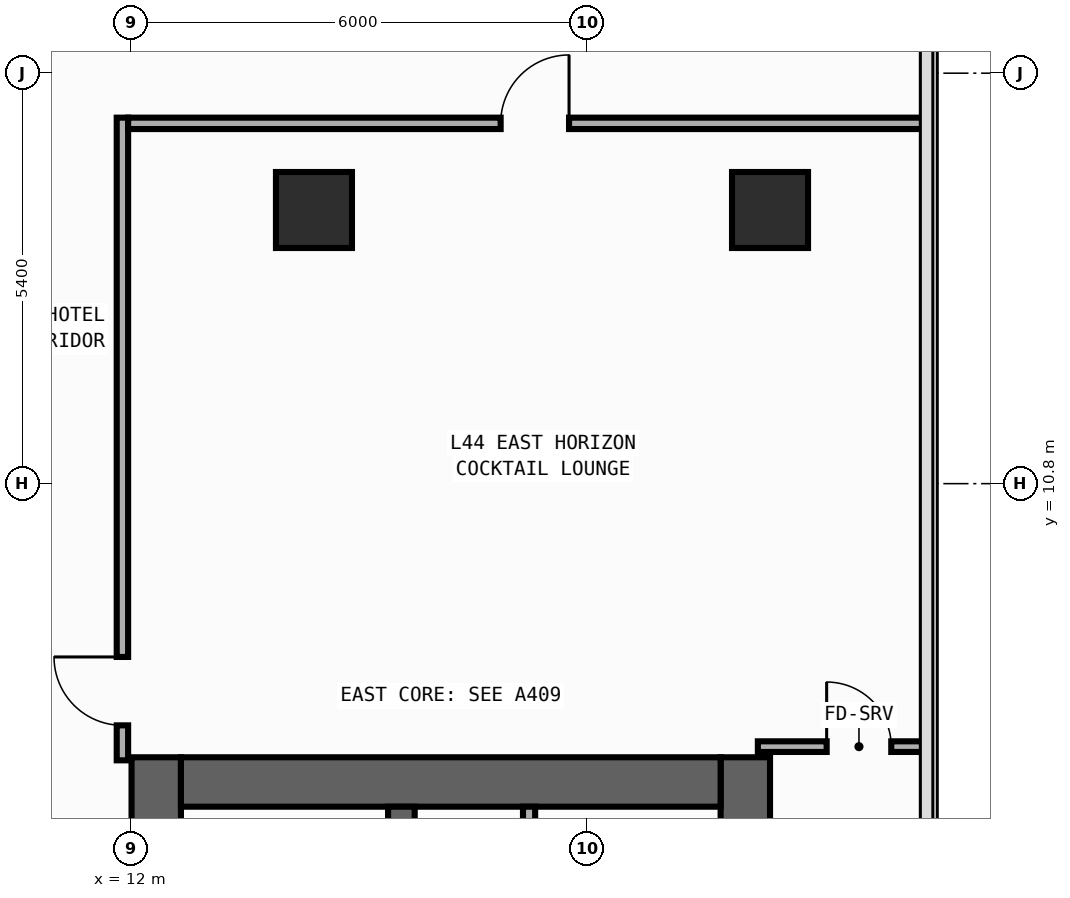
"""IFC4 building model, lengths in metres.
Left out: names, types, materials, properties, quantities, classifications, styles, units other than length and angle.
Written with IfcOpenShell. Run it as: python <this file> out.ifc"""

import sys

from ifc_helpers import new_model, si_unit, direction, frame, frame_2d, origin, origin_2d, place, context, subcontext, project, spatial, rectangle, extrude, element, fill, save


model = new_model("IFC4")
c1 = context("Model", 3, precision=1e-05, world=origin(), true_north=direction((0.0, 1.0)))
c2 = subcontext(c1, "Body", "Model", "MODEL_VIEW")
j1 = project(units=[si_unit("LENGTHUNIT", "METRE"), si_unit("PLANEANGLEUNIT", "RADIAN")], contexts=[c1])
p1 = place(None, origin())
s1 = spatial("IfcSite", under=j1, at=p1, CompositionType="ELEMENT")
p2 = place(p1, origin())
s2 = spatial("IfcBuilding", under=s1, at=p2, CompositionType="ELEMENT")
p3 = place(p2, frame((0.0, 0.0, 191.6)))
s3 = spatial("IfcBuildingStorey", under=s2, at=p3, CompositionType="ELEMENT", Elevation=191.6)
p4 = place(p3, frame((12.325, -19.8, 0.0), z_axis=(0.0, 0.0, 1.0), x_axis=(0.0, 1.0, 0.0)))
e1 = element("IfcWall", 1, at=p4, inside=s3, PredefinedType="SHEAR", context=c2, shape_type="SweptSolid", body=[
    extrude(rectangle(XDim=27.0, YDim=0.65, at=frame_2d((13.5, 0.0))), origin(), (0.0, 0.0, 1.0), 3.54),
])
p5 = place(p4, frame((23.05, 0.0, 0.0)))
e2 = element("IfcOpeningElement", 2, at=p5, cuts=e1, PredefinedType="OPENING", context=c2, shape_type="SweptSolid", body=[
    extrude(rectangle(XDim=1.1, YDim=2.2, at=frame_2d((0.55, 1.1))), frame((0.0, 0.335, 0.0), z_axis=(0.0, -1.0, 0.0), x_axis=(1.0, 0.0, 0.0)), (0.0, 0.0, 1.0), 0.67),
])
p6 = place(p4, frame((19.85, 0.0, 0.0)))
e3 = element("IfcOpeningElement", 3, at=p6, cuts=e1, PredefinedType="OPENING", context=c2, shape_type="SweptSolid", body=[
    extrude(rectangle(XDim=1.1, YDim=2.2, at=frame_2d((0.55, 1.1))), frame((0.0, 0.335, 0.0), z_axis=(0.0, -1.0, 0.0), x_axis=(1.0, 0.0, 0.0)), (0.0, 0.0, 1.0), 0.67),
])
p7 = place(p4, frame((16.65, 0.0, 0.0)))
e4 = element("IfcOpeningElement", 4, at=p7, cuts=e1, PredefinedType="OPENING", context=c2, shape_type="SweptSolid", body=[
    extrude(rectangle(XDim=1.1, YDim=2.2, at=frame_2d((0.55, 1.1))), frame((0.0, 0.335, 0.0), z_axis=(0.0, -1.0, 0.0), x_axis=(1.0, 0.0, 0.0)), (0.0, 0.0, 1.0), 0.67),
])
p8 = place(p4, frame((7.175, 0.0, 0.0)))
e5 = element("IfcOpeningElement", 5, at=p8, cuts=e1, PredefinedType="OPENING", context=c2, shape_type="SweptSolid", body=[
    extrude(rectangle(XDim=0.85, YDim=2.1, at=frame_2d((0.425, 1.05))), frame((0.0, 0.335, 0.0), z_axis=(0.0, -1.0, 0.0), x_axis=(1.0, 0.0, 0.0)), (0.0, 0.0, 1.0), 0.67),
])
p9 = place(p4, frame((10.375, 0.0, 0.0)))
e6 = element("IfcOpeningElement", 6, at=p9, cuts=e1, PredefinedType="OPENING", context=c2, shape_type="SweptSolid", body=[
    extrude(rectangle(XDim=0.85, YDim=2.1, at=frame_2d((0.425, 1.05))), frame((0.0, 0.335, 0.0), z_axis=(0.0, -1.0, 0.0), x_axis=(1.0, 0.0, 0.0)), (0.0, 0.0, 1.0), 0.67),
])
p10 = place(p4, frame((12.725, 0.0, 0.0)))
e7 = element("IfcOpeningElement", 7, at=p10, cuts=e1, PredefinedType="OPENING", context=c2, shape_type="SweptSolid", body=[
    extrude(rectangle(XDim=1.15, YDim=2.2, at=frame_2d((0.575, 1.1))), frame((0.0, 0.335, 0.0), z_axis=(0.0, -1.0, 0.0), x_axis=(1.0, 0.0, 0.0)), (0.0, 0.0, 1.0), 0.67),
])
p11 = place(p4, frame((25.125, 0.0, 0.0)))
e8 = element("IfcOpeningElement", 8, at=p11, cuts=e1, PredefinedType="OPENING", context=c2, shape_type="SweptSolid", body=[
    extrude(rectangle(XDim=0.85, YDim=2.1, at=frame_2d((0.425, 1.05))), frame((0.0, 0.335, 0.0), z_axis=(0.0, -1.0, 0.0), x_axis=(1.0, 0.0, 0.0)), (0.0, 0.0, 1.0), 0.67),
])
p12 = place(p3, frame((20.075, -19.8, 0.0), z_axis=(0.0, 0.0, 1.0), x_axis=(0.0, 1.0, 0.0)))
e9 = element("IfcWall", 9, at=p12, inside=s3, PredefinedType="SHEAR", context=c2, shape_type="SweptSolid", body=[
    extrude(rectangle(XDim=27.0, YDim=0.65, at=frame_2d((13.5, 0.0))), origin(), (0.0, 0.0, 1.0), 3.54),
])
p13 = place(p3, frame((12.65, 6.875, 0.0), z_axis=(0.0, 0.0, 1.0), x_axis=(1.0, 0.0, 0.0)))
e10 = element("IfcWall", 10, at=p13, inside=s3, PredefinedType="SHEAR", context=c2, shape_type="SweptSolid", body=[
    extrude(rectangle(XDim=7.1, YDim=0.65, at=frame_2d((3.55, 0.0))), origin(), (0.0, 0.0, 1.0), 3.54),
])
p14 = place(p3, frame((15.55, -19.15, 0.0), z_axis=(0.0, 0.0, 1.0), x_axis=(0.0, 1.0, 0.0)))
e11 = element("IfcWall", 11, at=p14, inside=s3, PredefinedType="SHEAR", context=c2, shape_type="SweptSolid", body=[
    extrude(rectangle(XDim=25.7, YDim=0.35, at=frame_2d((12.85, 0.0))), origin(), (0.0, 0.0, 1.0), 3.54),
])
p15 = place(p14, frame((12.075, 0.0, 0.0)))
e12 = element("IfcOpeningElement", 12, at=p15, cuts=e11, PredefinedType="OPENING", context=c2, shape_type="SweptSolid", body=[
    extrude(rectangle(XDim=1.15, YDim=2.2, at=frame_2d((0.575, 1.1))), frame((0.0, 0.185, 0.0), z_axis=(0.0, -1.0, 0.0), x_axis=(1.0, 0.0, 0.0)), (0.0, 0.0, 1.0), 0.37),
])
p16 = place(p14, frame((24.475, 0.0, 0.0)))
e13 = element("IfcOpeningElement", 13, at=p16, cuts=e11, PredefinedType="OPENING", context=c2, shape_type="SweptSolid", body=[
    extrude(rectangle(XDim=0.85, YDim=2.1, at=frame_2d((0.425, 1.05))), frame((0.0, 0.185, 0.0), z_axis=(0.0, -1.0, 0.0), x_axis=(1.0, 0.0, 0.0)), (0.0, 0.0, 1.0), 0.37),
])
for number, where, z_axis, x_axis in (
    (14, (20.4, 14.4, 0.0), (0.0, 0.0, 1.0), (1.0, 0.0, 0.0)),
    (15, (14.4, 14.4, 0.0), (0.0, 0.0, 1.0), (1.0, 0.0, 0.0)),
):
    element("IfcColumn", number, at=place(p3, frame(where, z_axis=z_axis, x_axis=x_axis)), inside=s3, PredefinedType="COLUMN", context=c2, shape_type="SweptSolid", body=[
        extrude(rectangle(XDim=1.0, YDim=1.0, at=origin_2d()), origin(), (0.0, 0.0, 1.0), 3.8),
    ])
p17 = place(p3, frame((17.23, 4.17, 0.0), z_axis=(0.0, 0.0, 1.0), x_axis=(0.0, 1.0, 0.0)))
e16 = element("IfcWall", 16, at=p17, inside=s3, PredefinedType="PARTITIONING", context=c2, shape_type="SweptSolid", body=[
    extrude(rectangle(XDim=2.38, YDim=0.16, at=frame_2d((1.19, 0.0))), origin(), (0.0, 0.0, 1.0), 3.54),
])
p18 = place(p17, frame((0.46, 0.0, 0.0)))
e17 = element("IfcOpeningElement", 17, at=p18, cuts=e16, PredefinedType="OPENING", context=c2, shape_type="SweptSolid", body=[
    extrude(rectangle(XDim=0.85, YDim=2.1, at=frame_2d((0.425, 1.05))), frame((0.0, 0.09, 0.0), z_axis=(0.0, -1.0, 0.0), x_axis=(1.0, 0.0, 0.0)), (0.0, 0.0, 1.0), 0.18),
])
p19 = place(p3, frame((11.88, 7.16, 0.0), z_axis=(0.0, 0.0, 1.0), x_axis=(0.0, 1.0, 0.0)))
e18 = element("IfcWall", 18, at=p19, inside=s3, PredefinedType="PARTITIONING", context=c2, shape_type="SweptSolid", body=[
    extrude(rectangle(XDim=8.455, YDim=0.15, at=frame_2d((4.228, 0.0))), origin(), (0.0, 0.0, 1.0), 3.54),
])
p20 = place(p19, frame((0.46, 0.0, 0.0)))
e19 = element("IfcOpeningElement", 19, at=p20, cuts=e18, PredefinedType="OPENING", context=c2, shape_type="SweptSolid", body=[
    extrude(rectangle(XDim=0.9, YDim=2.15, at=frame_2d((0.45, 1.075))), frame((0.0, 0.085, 0.0), z_axis=(0.0, -1.0, 0.0), x_axis=(1.0, 0.0, 0.0)), (0.0, 0.0, 1.0), 0.17),
])
p21 = place(p3, frame((11.955, 15.54, 0.0), z_axis=(0.0, 0.0, 1.0), x_axis=(1.0, 0.0, 0.0)))
e20 = element("IfcWall", 20, at=p21, inside=s3, PredefinedType="PARTITIONING", context=c2, shape_type="SweptSolid", body=[
    extrude(rectangle(XDim=10.5, YDim=0.15, at=frame_2d((5.25, 0.0))), origin(), (0.0, 0.0, 1.0), 3.54),
])
p22 = place(p21, frame((4.901, 0.0, 0.0)))
e21 = element("IfcOpeningElement", 21, at=p22, cuts=e20, PredefinedType="OPENING", context=c2, shape_type="SweptSolid", body=[
    extrude(rectangle(XDim=0.9, YDim=2.15, at=frame_2d((0.45, 1.075))), frame((0.0, 0.085, 0.0), z_axis=(0.0, -1.0, 0.0), x_axis=(1.0, 0.0, 0.0)), (0.0, 0.0, 1.0), 0.17),
])
p23 = place(p3, frame((20.24, 7.34, 0.0), z_axis=(0.0, 0.0, 1.0), x_axis=(1.0, 0.0, 0.0)))
e22 = element("IfcWall", 22, at=p23, inside=s3, PredefinedType="PARTITIONING", context=c2, shape_type="SweptSolid", body=[
    extrude(rectangle(XDim=2.215, YDim=0.14, at=frame_2d((1.107, 0.0))), origin(), (0.0, 0.0, 1.0), 3.54),
])
p24 = place(p23, frame((0.905, 0.0, 0.0)))
e23 = element("IfcOpeningElement", 23, at=p24, cuts=e22, PredefinedType="OPENING", context=c2, shape_type="SweptSolid", body=[
    extrude(rectangle(XDim=0.85, YDim=2.1, at=frame_2d((0.425, 1.05))), frame((0.0, 0.08, 0.0), z_axis=(0.0, -1.0, 0.0), x_axis=(1.0, 0.0, 0.0)), (0.0, 0.0, 1.0), 0.16),
])
p25 = place(p20, origin())
e24 = element("IfcDoor", 24, at=p25, inside=s3, OperationType="SINGLE_SWING_RIGHT", PredefinedType="DOOR", context=c2, shape_type="SweptSolid", body=[
    extrude(rectangle(XDim=0.9, YDim=2.15, at=frame_2d((0.45, 1.075))), frame((0.0, 0.025, 0.0), z_axis=(0.0, -1.0, 0.0), x_axis=(1.0, 0.0, 0.0)), (0.0, 0.0, 1.0), 0.05),
])
fill(e19, e24)
p26 = place(p22, origin())
e25 = element("IfcDoor", 25, at=p26, inside=s3, OperationType="SINGLE_SWING_RIGHT", PredefinedType="DOOR", context=c2, shape_type="SweptSolid", body=[
    extrude(rectangle(XDim=0.9, YDim=2.15, at=frame_2d((0.45, 1.075))), frame((0.0, 0.025, 0.0), z_axis=(0.0, -1.0, 0.0), x_axis=(1.0, 0.0, 0.0)), (0.0, 0.0, 1.0), 0.05),
])
fill(e21, e25)
p27 = place(p24, origin())
e26 = element("IfcDoor", 26, at=p27, inside=s3, OperationType="SINGLE_SWING_LEFT", PredefinedType="DOOR", context=c2, shape_type="SweptSolid", body=[
    extrude(rectangle(XDim=0.85, YDim=2.1, at=frame_2d((0.425, 1.05))), frame((0.0, 0.025, 0.0), z_axis=(0.0, -1.0, 0.0), x_axis=(1.0, 0.0, 0.0)), (0.0, 0.0, 1.0), 0.05),
])
fill(e23, e26)
save(model, sys.argv[1])
